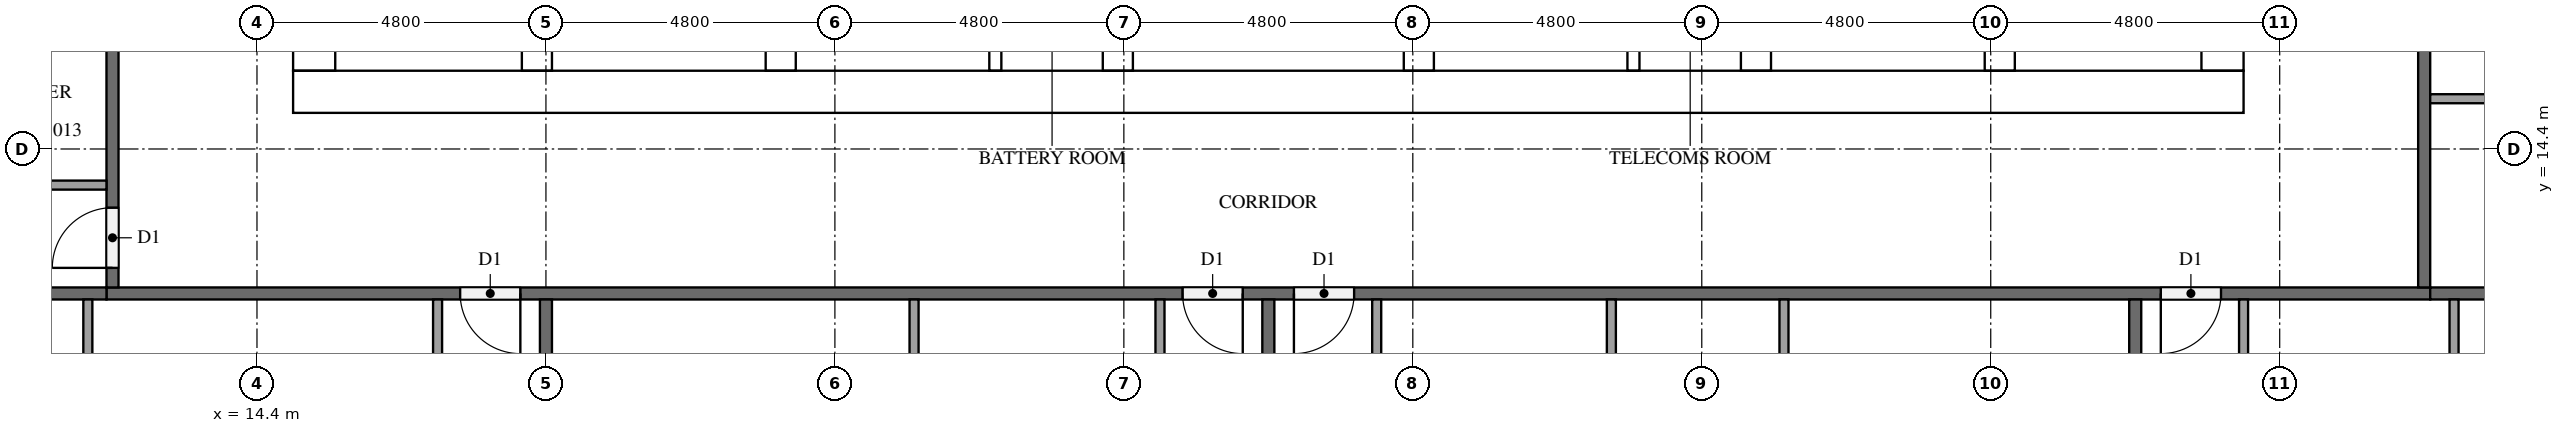
"""IFC4 building model, lengths in metres.
Left out: names, types, materials, properties, quantities, classifications, styles, units other than length and angle.
Written with IfcOpenShell. Run it as: python <this file> out.ifc"""

import sys

from ifc_helpers import new_model, si_unit, direction, frame, frame_2d, origin, place, context, subcontext, project, spatial, rectangle, extrude, element, fill, save


model = new_model("IFC4")
c1 = context("Model", 3, precision=1e-05, world=origin(), true_north=direction((0.0, 1.0)))
c2 = subcontext(c1, "Body", "Model", "MODEL_VIEW")
j1 = project(units=[si_unit("LENGTHUNIT", "METRE"), si_unit("PLANEANGLEUNIT", "RADIAN")], contexts=[c1])
p1 = place(None, origin())
s1 = spatial("IfcSite", under=j1, at=p1, CompositionType="ELEMENT")
p2 = place(p1, origin())
s2 = spatial("IfcBuilding", under=s1, at=p2, CompositionType="ELEMENT")
p3 = place(p2, frame((0.0, 0.0, 192.9)))
s3 = spatial("IfcBuildingStorey", under=s2, at=p3, CompositionType="ELEMENT", Elevation=192.9)
p4 = place(p3, frame((15.0, 15.35, 0.0), z_axis=(0.0, 0.0, 1.0), x_axis=(1.0, 0.0, 0.0)))
e1 = element("IfcWall", 1, at=p4, inside=s3, PredefinedType="SHEAR", context=c2, shape_type="SweptSolid", body=[
    extrude(rectangle(XDim=32.4, YDim=0.7, at=frame_2d((16.2, 0.0))), origin(), (0.0, 0.0, 1.0), 3.2),
])
p5 = place(p4, frame((15.3, 0.0, 0.0)))
e2 = element("IfcOpeningElement", 2, at=p5, cuts=e1, PredefinedType="OPENING", context=c2, shape_type="SweptSolid", body=[
    extrude(rectangle(XDim=1.8, YDim=2.1, at=frame_2d((0.9, 1.05))), frame((0.0, 0.36, 0.0), z_axis=(0.0, -1.0, 0.0), x_axis=(1.0, 0.0, 0.0)), (0.0, 0.0, 1.0), 0.72),
])
p6 = place(p3, frame((15.35, 15.7, 0.0), z_axis=(0.0, 0.0, 1.0), x_axis=(0.0, 1.0, 0.0)))
e3 = element("IfcWall", 3, at=p6, inside=s3, PredefinedType="SHEAR", context=c2, shape_type="SweptSolid", body=[
    extrude(rectangle(XDim=21.4, YDim=0.7, at=frame_2d((10.7, 0.0))), origin(), (0.0, 0.0, 1.0), 3.2),
])
p7 = place(p6, frame((5.06, 0.0, 0.0)))
e4 = element("IfcOpeningElement", 4, at=p7, cuts=e3, PredefinedType="OPENING", context=c2, shape_type="SweptSolid", body=[
    extrude(rectangle(XDim=1.2, YDim=2.1, at=frame_2d((0.6, 1.05))), frame((0.0, 0.36, 0.0), z_axis=(0.0, -1.0, 0.0), x_axis=(1.0, 0.0, 0.0)), (0.0, 0.0, 1.0), 0.72),
])
p8 = place(p3, frame((47.05, 15.7, 0.0), z_axis=(0.0, 0.0, 1.0), x_axis=(0.0, 1.0, 0.0)))
e5 = element("IfcWall", 5, at=p8, inside=s3, PredefinedType="SHEAR", context=c2, shape_type="SweptSolid", body=[
    extrude(rectangle(XDim=21.4, YDim=0.7, at=frame_2d((10.7, 0.0))), origin(), (0.0, 0.0, 1.0), 3.2),
])
p9 = place(p8, frame((10.4, 0.0, 0.0)))
e6 = element("IfcOpeningElement", 6, at=p9, cuts=e5, PredefinedType="OPENING", context=c2, shape_type="SweptSolid", body=[
    extrude(rectangle(XDim=1.2, YDim=2.1, at=frame_2d((0.6, 1.05))), frame((0.0, 0.36, 0.0), z_axis=(0.0, -1.0, 0.0), x_axis=(1.0, 0.0, 0.0)), (0.0, 0.0, 1.0), 0.72),
])
p10 = place(p3, frame((19.05, 15.7, 0.0), z_axis=(0.0, 0.0, 1.0), x_axis=(0.0, 1.0, 0.0)))
e7 = element("IfcWall", 7, at=p10, inside=s3, PredefinedType="SHEAR", context=c2, shape_type="SweptSolid", body=[
    extrude(rectangle(XDim=15.3, YDim=0.5, at=frame_2d((7.65, 0.0))), origin(), (0.0, 0.0, 1.0), 3.2),
])
p11 = place(p10, frame((9.75, 0.0, 0.0)))
e8 = element("IfcOpeningElement", 8, at=p11, cuts=e7, PredefinedType="OPENING", context=c2, shape_type="SweptSolid", body=[
    extrude(rectangle(XDim=1.1, YDim=2.1, at=frame_2d((0.55, 1.05))), frame((0.0, 0.26, 0.0), z_axis=(0.0, -1.0, 0.0), x_axis=(1.0, 0.0, 0.0)), (0.0, 0.0, 1.0), 0.52),
])
p12 = place(p10, frame((13.25, 0.0, 0.0)))
e9 = element("IfcOpeningElement", 9, at=p12, cuts=e7, PredefinedType="OPENING", context=c2, shape_type="SweptSolid", body=[
    extrude(rectangle(XDim=1.1, YDim=2.1, at=frame_2d((0.55, 1.05))), frame((0.0, 0.26, 0.0), z_axis=(0.0, -1.0, 0.0), x_axis=(1.0, 0.0, 0.0)), (0.0, 0.0, 1.0), 0.52),
])
p13 = place(p10, frame((0.5, 0.0, 0.0)))
e10 = element("IfcOpeningElement", 10, at=p13, cuts=e7, PredefinedType="OPENING", context=c2, shape_type="SweptSolid", body=[
    extrude(rectangle(XDim=1.2, YDim=2.1, at=frame_2d((0.6, 1.05))), frame((0.0, 0.26, 0.0), z_axis=(0.0, -1.0, 0.0), x_axis=(1.0, 0.0, 0.0)), (0.0, 0.0, 1.0), 0.52),
])
p14 = place(p3, frame((23.1, 15.7, 0.0), z_axis=(0.0, 0.0, 1.0), x_axis=(0.0, 1.0, 0.0)))
e11 = element("IfcWall", 11, at=p14, inside=s3, PredefinedType="SHEAR", context=c2, shape_type="SweptSolid", body=[
    extrude(rectangle(XDim=21.4, YDim=0.5, at=frame_2d((10.7, 0.0))), origin(), (0.0, 0.0, 1.0), 3.2),
])
p15 = place(p3, frame((39.3, 15.7, 0.0), z_axis=(0.0, 0.0, 1.0), x_axis=(0.0, 1.0, 0.0)))
e12 = element("IfcWall", 12, at=p15, inside=s3, PredefinedType="SHEAR", context=c2, shape_type="SweptSolid", body=[
    extrude(rectangle(XDim=8.55, YDim=0.5, at=frame_2d((4.275, 0.0))), origin(), (0.0, 0.0, 1.0), 3.2),
])
p16 = place(p3, frame((43.35, 15.7, 0.0), z_axis=(0.0, 0.0, 1.0), x_axis=(0.0, 1.0, 0.0)))
e13 = element("IfcWall", 13, at=p16, inside=s3, PredefinedType="SHEAR", context=c2, shape_type="SweptSolid", body=[
    extrude(rectangle(XDim=8.55, YDim=0.5, at=frame_2d((4.275, 0.0))), origin(), (0.0, 0.0, 1.0), 3.2),
])
p17 = place(p16, frame((0.5, 0.0, 0.0)))
e14 = element("IfcOpeningElement", 14, at=p17, cuts=e13, PredefinedType="OPENING", context=c2, shape_type="SweptSolid", body=[
    extrude(rectangle(XDim=1.2, YDim=2.1, at=frame_2d((0.6, 1.05))), frame((0.0, 0.26, 0.0), z_axis=(0.0, -1.0, 0.0), x_axis=(1.0, 0.0, 0.0)), (0.0, 0.0, 1.0), 0.52),
])
for number, where, z_axis, x_axis in (
    (15, (28.7, 15.7, 0.0), (0.0, 0.0, 1.0), (0.0, 1.0, 0.0)),
    (16, (33.7, 15.7, 0.0), (0.0, 0.0, 1.0), (0.0, 1.0, 0.0)),
):
    element("IfcWall", number, at=place(p3, frame(where, z_axis=z_axis, x_axis=x_axis)), inside=s3, PredefinedType="SHEAR", context=c2, shape_type="SweptSolid", body=[
        extrude(rectangle(XDim=2.8, YDim=0.5, at=frame_2d((1.4, 0.0))), origin(), (0.0, 0.0, 1.0), 3.2),
    ])
for number, where, z_axis, x_axis in (
    (17, (26.665, 15.7, 0.0), (0.0, 0.0, 1.0), (0.0, 1.0, 0.0)),
    (18, (37.265, 15.7, 0.0), (0.0, 0.0, 1.0), (0.0, 1.0, 0.0)),
):
    element("IfcWall", number, at=place(p3, frame(where, z_axis=z_axis, x_axis=x_axis)), inside=s3, PredefinedType="PARTITIONING", context=c2, shape_type="SweptSolid", body=[
        extrude(rectangle(XDim=2.8, YDim=0.2, at=frame_2d((1.4, 0.0))), origin(), (0.0, 0.0, 1.0), 3.2),
    ])
p18 = place(p3, frame((50.5, 12.0, 0.0), z_axis=(0.0, 0.0, 1.0), x_axis=(-1.0, 0.0, 0.0)))
e19 = element("IfcWall", 19, at=p18, inside=s3, PredefinedType="PARTITIONING", context=c2, shape_type="SweptSolid", body=[
    extrude(rectangle(XDim=38.6, YDim=0.2, at=frame_2d((19.3, 0.0))), origin(), (0.0, 0.0, 1.0), 3.2),
])
p19 = place(p18, frame((31.725, 0.0, 0.0)))
e20 = element("IfcOpeningElement", 20, at=p19, cuts=e19, PredefinedType="OPENING", context=c2, shape_type="SweptSolid", body=[
    extrude(rectangle(XDim=1.0, YDim=2.1, at=frame_2d((0.5, 1.05))), frame((0.0, 0.11, 0.0), z_axis=(0.0, -1.0, 0.0), x_axis=(1.0, 0.0, 0.0)), (0.0, 0.0, 1.0), 0.22),
])
p20 = place(p18, frame((19.725, 0.0, 0.0)))
e21 = element("IfcOpeningElement", 21, at=p20, cuts=e19, PredefinedType="OPENING", context=c2, shape_type="SweptSolid", body=[
    extrude(rectangle(XDim=1.0, YDim=2.1, at=frame_2d((0.5, 1.05))), frame((0.0, 0.11, 0.0), z_axis=(0.0, -1.0, 0.0), x_axis=(1.0, 0.0, 0.0)), (0.0, 0.0, 1.0), 0.22),
])
p21 = place(p18, frame((17.875, 0.0, 0.0)))
e22 = element("IfcOpeningElement", 22, at=p21, cuts=e19, PredefinedType="OPENING", context=c2, shape_type="SweptSolid", body=[
    extrude(rectangle(XDim=1.0, YDim=2.1, at=frame_2d((0.5, 1.05))), frame((0.0, 0.11, 0.0), z_axis=(0.0, -1.0, 0.0), x_axis=(1.0, 0.0, 0.0)), (0.0, 0.0, 1.0), 0.22),
])
p22 = place(p18, frame((3.475, 0.0, 0.0)))
e23 = element("IfcOpeningElement", 23, at=p22, cuts=e19, PredefinedType="OPENING", context=c2, shape_type="SweptSolid", body=[
    extrude(rectangle(XDim=1.0, YDim=2.1, at=frame_2d((0.5, 1.05))), frame((0.0, 0.11, 0.0), z_axis=(0.0, -1.0, 0.0), x_axis=(1.0, 0.0, 0.0)), (0.0, 0.0, 1.0), 0.22),
])
p23 = place(p3, frame((50.4, 40.7, 0.0), z_axis=(0.0, 0.0, 1.0), x_axis=(0.0, -1.0, 0.0)))
e24 = element("IfcWall", 24, at=p23, inside=s3, PredefinedType="PARTITIONING", context=c2, shape_type="SweptSolid", body=[
    extrude(rectangle(XDim=28.6, YDim=0.2, at=frame_2d((14.3, 0.0))), origin(), (0.0, 0.0, 1.0), 3.2),
])
p24 = place(p23, frame((21.925, 0.0, 0.0)))
e25 = element("IfcOpeningElement", 25, at=p24, cuts=e24, PredefinedType="OPENING", context=c2, shape_type="SweptSolid", body=[
    extrude(rectangle(XDim=1.0, YDim=2.1, at=frame_2d((0.5, 1.05))), frame((0.0, 0.11, 0.0), z_axis=(0.0, -1.0, 0.0), x_axis=(1.0, 0.0, 0.0)), (0.0, 0.0, 1.0), 0.22),
])
p25 = place(p23, frame((20.075, 0.0, 0.0)))
e26 = element("IfcOpeningElement", 26, at=p25, cuts=e24, PredefinedType="OPENING", context=c2, shape_type="SweptSolid", body=[
    extrude(rectangle(XDim=1.0, YDim=2.1, at=frame_2d((0.5, 1.05))), frame((0.0, 0.11, 0.0), z_axis=(0.0, -1.0, 0.0), x_axis=(1.0, 0.0, 0.0)), (0.0, 0.0, 1.0), 0.22),
])
p26 = place(p23, frame((0.325, 0.0, 0.0)))
e27 = element("IfcOpeningElement", 27, at=p26, cuts=e24, PredefinedType="OPENING", context=c2, shape_type="SweptSolid", body=[
    extrude(rectangle(XDim=1.0, YDim=2.1, at=frame_2d((0.5, 1.05))), frame((0.0, 0.11, 0.0), z_axis=(0.0, -1.0, 0.0), x_axis=(1.0, 0.0, 0.0)), (0.0, 0.0, 1.0), 0.22),
])
p27 = place(p3, frame((12.0, 12.1, 0.0), z_axis=(0.0, 0.0, 1.0), x_axis=(0.0, 1.0, 0.0)))
e28 = element("IfcWall", 28, at=p27, inside=s3, PredefinedType="PARTITIONING", context=c2, shape_type="SweptSolid", body=[
    extrude(rectangle(XDim=28.6, YDim=0.2, at=frame_2d((14.3, 0.0))), origin(), (0.0, 0.0, 1.0), 3.2),
])
p28 = place(p27, frame((27.275, 0.0, 0.0)))
e29 = element("IfcOpeningElement", 29, at=p28, cuts=e28, PredefinedType="OPENING", context=c2, shape_type="SweptSolid", body=[
    extrude(rectangle(XDim=1.0, YDim=2.1, at=frame_2d((0.5, 1.05))), frame((0.0, 0.11, 0.0), z_axis=(0.0, -1.0, 0.0), x_axis=(1.0, 0.0, 0.0)), (0.0, 0.0, 1.0), 0.22),
])
p29 = place(p27, frame((0.325, 0.0, 0.0)))
e30 = element("IfcOpeningElement", 30, at=p29, cuts=e28, PredefinedType="OPENING", context=c2, shape_type="SweptSolid", body=[
    extrude(rectangle(XDim=1.0, YDim=2.1, at=frame_2d((0.5, 1.05))), frame((0.0, 0.11, 0.0), z_axis=(0.0, -1.0, 0.0), x_axis=(1.0, 0.0, 0.0)), (0.0, 0.0, 1.0), 0.22),
])
p30 = place(p3, frame((19.2, 11.9, 0.0), z_axis=(0.0, 0.0, 1.0), x_axis=(0.0, -1.0, 0.0)))
e31 = element("IfcWall", 31, at=p30, inside=s3, PredefinedType="PARTITIONING", context=c2, shape_type="SweptSolid", body=[
    extrude(rectangle(XDim=11.575, YDim=0.2, at=frame_2d((5.788, 0.0))), origin(), (0.0, 0.0, 1.0), 3.2),
])
p31 = place(p3, frame((4.9, 12.0, 0.0), z_axis=(0.0, 0.0, 1.0), x_axis=(1.0, 0.0, 0.0)))
e32 = element("IfcWall", 32, at=p31, inside=s3, PredefinedType="PARTITIONING", context=c2, shape_type="SweptSolid", body=[
    extrude(rectangle(XDim=7.0, YDim=0.2, at=frame_2d((3.5, 0.0))), origin(), (0.0, 0.0, 1.0), 3.2),
])
for number, where, z_axis, x_axis in (
    (33, (31.2, 11.9, 0.0), (0.0, 0.0, 1.0), (0.0, -1.0, 0.0)),
    (34, (45.6, 11.9, 0.0), (0.0, 0.0, 1.0), (0.0, -1.0, 0.0)),
):
    element("IfcWall", number, at=place(p3, frame(where, z_axis=z_axis, x_axis=x_axis)), inside=s3, PredefinedType="PARTITIONING", context=c2, shape_type="SweptSolid", body=[
        extrude(rectangle(XDim=11.8, YDim=0.2, at=frame_2d((5.9, 0.0))), origin(), (0.0, 0.0, 1.0), 3.2),
    ])
p32 = place(p3, frame((50.5, 12.0, 0.0), z_axis=(0.0, 0.0, 1.0), x_axis=(1.0, 0.0, 0.0)))
e35 = element("IfcWall", 35, at=p32, inside=s3, PredefinedType="PARTITIONING", context=c2, shape_type="SweptSolid", body=[
    extrude(rectangle(XDim=11.8, YDim=0.2, at=frame_2d((5.9, 0.0))), origin(), (0.0, 0.0, 1.0), 3.2),
])
p33 = place(p3, frame((11.59, 11.9, 0.0), z_axis=(0.0, 0.0, 1.0), x_axis=(0.0, -1.0, 0.0)))
e36 = element("IfcWall", 36, at=p33, inside=s3, PredefinedType="PARTITIONING", context=c2, shape_type="SweptSolid", body=[
    extrude(rectangle(XDim=4.175, YDim=0.15, at=frame_2d((2.087, 0.0))), origin(), (0.0, 0.0, 1.0), 3.2),
])
p34 = place(p3, frame((17.4, 11.9, 0.0), z_axis=(0.0, 0.0, 1.0), x_axis=(0.0, -1.0, 0.0)))
e37 = element("IfcWall", 37, at=p34, inside=s3, PredefinedType="PARTITIONING", context=c2, shape_type="SweptSolid", body=[
    extrude(rectangle(XDim=4.325, YDim=0.15, at=frame_2d((2.163, 0.0))), origin(), (0.0, 0.0, 1.0), 3.2),
])
p35 = place(p3, frame((25.315, 11.9, 0.0), z_axis=(0.0, 0.0, 1.0), x_axis=(0.0, -1.0, 0.0)))
e38 = element("IfcWall", 38, at=p35, inside=s3, PredefinedType="PARTITIONING", context=c2, shape_type="SweptSolid", body=[
    extrude(rectangle(XDim=4.475, YDim=0.15, at=frame_2d((2.237, 0.0))), origin(), (0.0, 0.0, 1.0), 3.2),
])
p36 = place(p3, frame((29.4, 11.9, 0.0), z_axis=(0.0, 0.0, 1.0), x_axis=(0.0, -1.0, 0.0)))
e39 = element("IfcWall", 39, at=p36, inside=s3, PredefinedType="PARTITIONING", context=c2, shape_type="SweptSolid", body=[
    extrude(rectangle(XDim=4.625, YDim=0.15, at=frame_2d((2.312, 0.0))), origin(), (0.0, 0.0, 1.0), 3.2),
])
for number, where, z_axis, x_axis in (
    (40, (36.898, 11.9, 0.0), (0.0, 0.0, 1.0), (0.0, -1.0, 0.0)),
    (41, (39.765, 11.9, 0.0), (0.0, 0.0, 1.0), (0.0, -1.0, 0.0)),
):
    element("IfcWall", number, at=place(p3, frame(where, z_axis=z_axis, x_axis=x_axis)), inside=s3, PredefinedType="PARTITIONING", context=c2, shape_type="SweptSolid", body=[
        extrude(rectangle(XDim=3.575, YDim=0.15, at=frame_2d((1.788, 0.0))), origin(), (0.0, 0.0, 1.0), 3.2),
    ])
p37 = place(p3, frame((33.0, 11.9, 0.0), z_axis=(0.0, 0.0, 1.0), x_axis=(0.0, -1.0, 0.0)))
e42 = element("IfcWall", 42, at=p37, inside=s3, PredefinedType="PARTITIONING", context=c2, shape_type="SweptSolid", body=[
    extrude(rectangle(XDim=3.725, YDim=0.15, at=frame_2d((1.862, 0.0))), origin(), (0.0, 0.0, 1.0), 3.2),
])
p38 = place(p3, frame((50.896, 11.9, 0.0), z_axis=(0.0, 0.0, 1.0), x_axis=(0.0, -1.0, 0.0)))
e43 = element("IfcWall", 43, at=p38, inside=s3, PredefinedType="PARTITIONING", context=c2, shape_type="SweptSolid", body=[
    extrude(rectangle(XDim=4.175, YDim=0.15, at=frame_2d((2.087, 0.0))), origin(), (0.0, 0.0, 1.0), 3.2),
])
p39 = place(p3, frame((47.4, 11.9, 0.0), z_axis=(0.0, 0.0, 1.0), x_axis=(0.0, -1.0, 0.0)))
e44 = element("IfcWall", 44, at=p39, inside=s3, PredefinedType="PARTITIONING", context=c2, shape_type="SweptSolid", body=[
    extrude(rectangle(XDim=4.325, YDim=0.15, at=frame_2d((2.163, 0.0))), origin(), (0.0, 0.0, 1.0), 3.2),
])
p40 = place(p3, frame((50.5, 15.235, 0.0), z_axis=(0.0, 0.0, 1.0), x_axis=(1.0, 0.0, 0.0)))
e45 = element("IfcWall", 45, at=p40, inside=s3, PredefinedType="PARTITIONING", context=c2, shape_type="SweptSolid", body=[
    extrude(rectangle(XDim=3.875, YDim=0.15, at=frame_2d((1.938, 0.0))), origin(), (0.0, 0.0, 1.0), 3.2),
])
p41 = place(p3, frame((11.9, 13.8, 0.0), z_axis=(0.0, 0.0, 1.0), x_axis=(-1.0, 0.0, 0.0)))
e46 = element("IfcWall", 46, at=p41, inside=s3, PredefinedType="PARTITIONING", context=c2, shape_type="SweptSolid", body=[
    extrude(rectangle(XDim=2.525, YDim=0.15, at=frame_2d((1.262, 0.0))), origin(), (0.0, 0.0, 1.0), 3.2),
])
p42 = place(p5, frame((1.8, 0.0, 0.0), z_axis=(0.0, 0.0, 1.0), x_axis=(-1.0, 0.0, 0.0)))
e47 = element("IfcDoor", 47, at=p42, inside=s3, OperationType="DOUBLE_DOOR_SINGLE_SWING", PredefinedType="DOOR", context=c2, shape_type="SweptSolid", body=[
    extrude(rectangle(XDim=1.8, YDim=2.1, at=frame_2d((0.9, 1.05))), frame((0.0, 0.025, 0.0), z_axis=(0.0, -1.0, 0.0), x_axis=(1.0, 0.0, 0.0)), (0.0, 0.0, 1.0), 0.05),
])
fill(e2, e47)
p43 = place(p19, origin())
e48 = element("IfcDoor", 48, at=p43, inside=s3, OperationType="SINGLE_SWING_LEFT", PredefinedType="DOOR", context=c2, shape_type="SweptSolid", body=[
    extrude(rectangle(XDim=1.0, YDim=2.1, at=frame_2d((0.5, 1.05))), frame((0.0, 0.025, 0.0), z_axis=(0.0, -1.0, 0.0), x_axis=(1.0, 0.0, 0.0)), (0.0, 0.0, 1.0), 0.05),
])
fill(e20, e48)
p44 = place(p20, origin())
e49 = element("IfcDoor", 49, at=p44, inside=s3, OperationType="SINGLE_SWING_LEFT", PredefinedType="DOOR", context=c2, shape_type="SweptSolid", body=[
    extrude(rectangle(XDim=1.0, YDim=2.1, at=frame_2d((0.5, 1.05))), frame((0.0, 0.025, 0.0), z_axis=(0.0, -1.0, 0.0), x_axis=(1.0, 0.0, 0.0)), (0.0, 0.0, 1.0), 0.05),
])
fill(e21, e49)
p45 = place(p21, origin())
e50 = element("IfcDoor", 50, at=p45, inside=s3, OperationType="SINGLE_SWING_RIGHT", PredefinedType="DOOR", context=c2, shape_type="SweptSolid", body=[
    extrude(rectangle(XDim=1.0, YDim=2.1, at=frame_2d((0.5, 1.05))), frame((0.0, 0.025, 0.0), z_axis=(0.0, -1.0, 0.0), x_axis=(1.0, 0.0, 0.0)), (0.0, 0.0, 1.0), 0.05),
])
fill(e22, e50)
p46 = place(p22, origin())
e51 = element("IfcDoor", 51, at=p46, inside=s3, OperationType="SINGLE_SWING_RIGHT", PredefinedType="DOOR", context=c2, shape_type="SweptSolid", body=[
    extrude(rectangle(XDim=1.0, YDim=2.1, at=frame_2d((0.5, 1.05))), frame((0.0, 0.025, 0.0), z_axis=(0.0, -1.0, 0.0), x_axis=(1.0, 0.0, 0.0)), (0.0, 0.0, 1.0), 0.05),
])
fill(e23, e51)
p47 = place(p29, origin())
e52 = element("IfcDoor", 52, at=p47, inside=s3, OperationType="SINGLE_SWING_LEFT", PredefinedType="DOOR", context=c2, shape_type="SweptSolid", body=[
    extrude(rectangle(XDim=1.0, YDim=2.1, at=frame_2d((0.5, 1.05))), frame((0.0, 0.025, 0.0), z_axis=(0.0, -1.0, 0.0), x_axis=(1.0, 0.0, 0.0)), (0.0, 0.0, 1.0), 0.05),
])
fill(e30, e52)
save(model, sys.argv[1])
